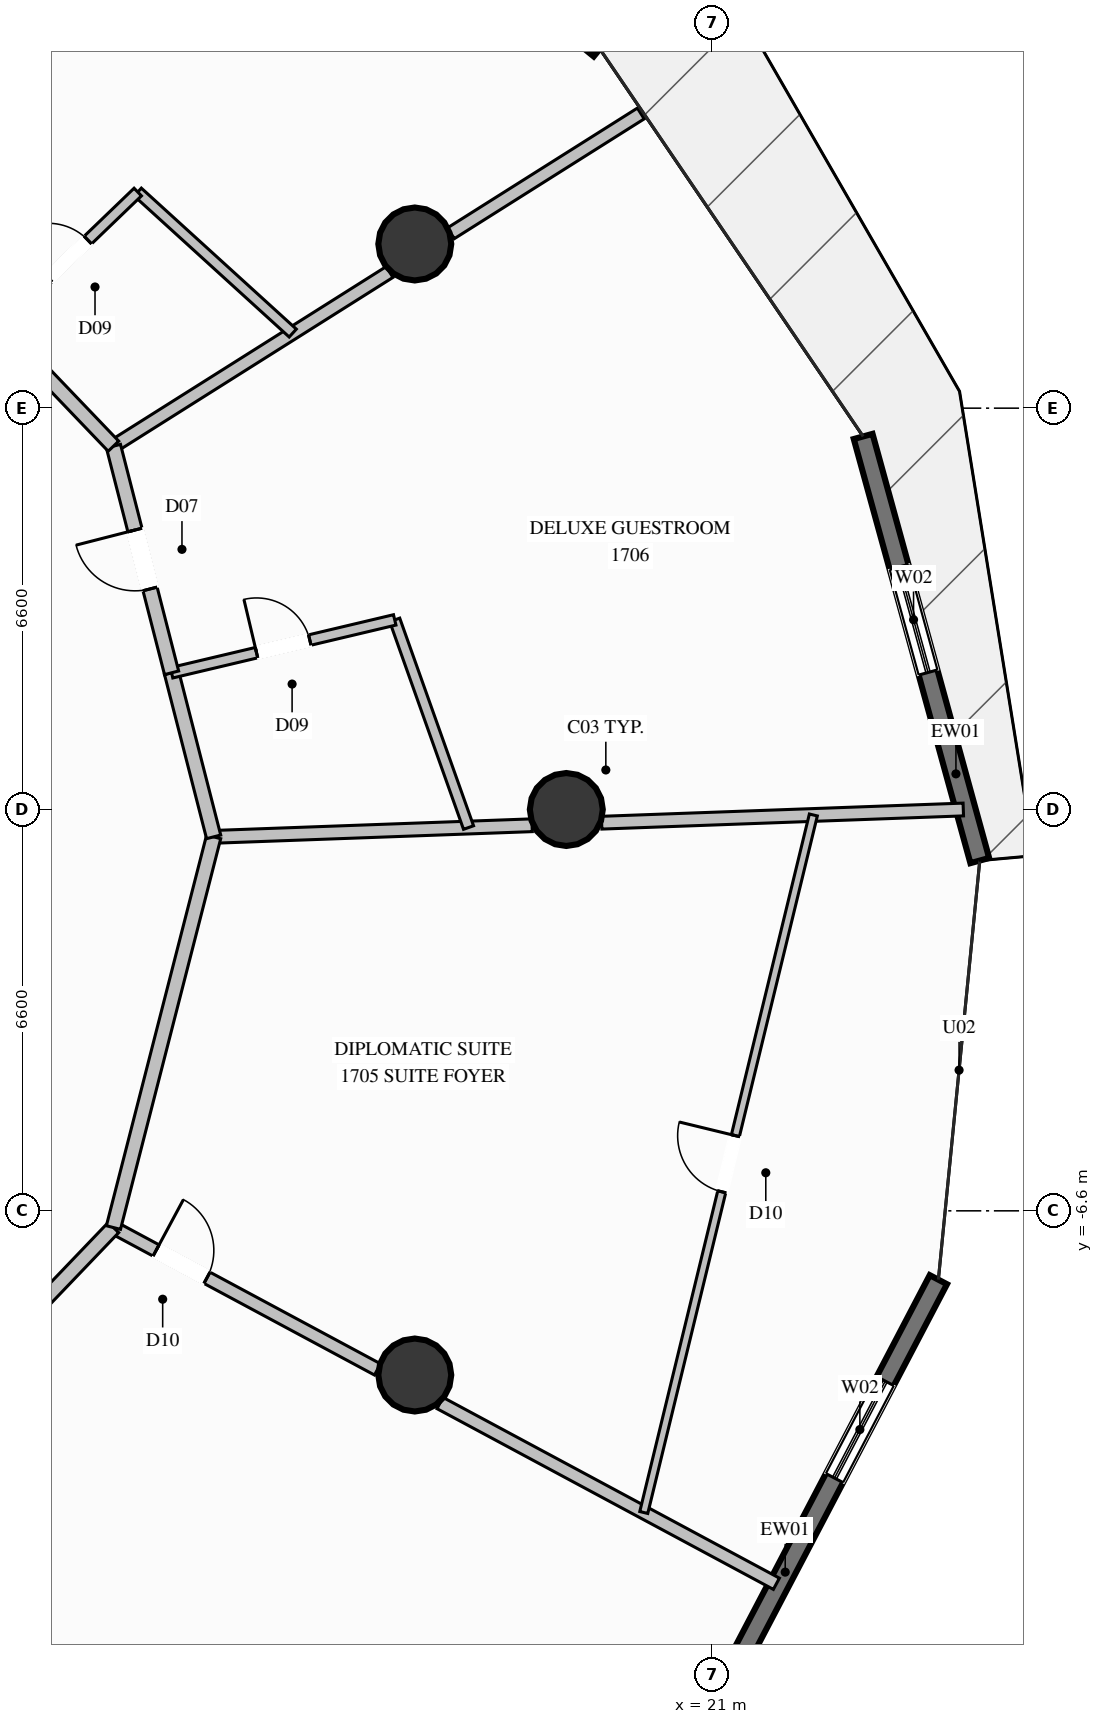
"""IFC4 building model, lengths in metres.
Left out: names, types, materials, properties, quantities, classifications, styles, units other than length and angle.
Written with IfcOpenShell. Run it as: python <this file> out.ifc"""

import sys

from ifc_helpers import new_model, si_unit, direction, frame, frame_2d, origin, origin_2d, place, context, subcontext, project, spatial, rectangle, circle, extrude, element, fill, save


model = new_model("IFC4")
c1 = context("Model", 3, precision=1e-05, world=origin(), true_north=direction((0.0, 1.0)))
c2 = subcontext(c1, "Body", "Model", "MODEL_VIEW")
j1 = project(units=[si_unit("LENGTHUNIT", "METRE"), si_unit("PLANEANGLEUNIT", "RADIAN")], contexts=[c1])
p1 = place(None, origin())
s1 = spatial("IfcSite", under=j1, at=p1, CompositionType="ELEMENT")
p2 = place(p1, origin())
s2 = spatial("IfcBuilding", under=s1, at=p2, CompositionType="ELEMENT")
p3 = place(p2, frame((0.0, 0.0, 64.4)))
s3 = spatial("IfcBuildingStorey", under=s2, at=p3, CompositionType="ELEMENT", Elevation=64.4)
for number, where, z_axis, x_axis in (
    (1, (18.6, 0.0, 0.0), (0.0, 0.0, 1.0), (1.0, 0.0, 0.0)),
    (2, (16.108, 9.3, 0.0), (0.0, 0.0, 1.0), (1.0, 0.0, 0.0)),
    (3, (16.108, -9.3, 0.0), (0.0, 0.0, 1.0), (1.0, 0.0, 0.0)),
):
    element("IfcColumn", number, at=place(p3, frame(where, z_axis=z_axis, x_axis=x_axis)), inside=s3, PredefinedType="COLUMN", context=c2, shape_type="SweptSolid", body=[
        extrude(circle(Radius=0.6, at=origin_2d()), origin(), (0.0, 0.0, 1.0), 3.6),
    ])
p4 = place(p3, frame((23.482, 6.135, 0.0), z_axis=(0.0, 0.0, 1.0), x_axis=(0.265132950738, -0.964211863873, 0.0)))
e4 = element("IfcWall", 4, at=p4, inside=s3, PredefinedType="SOLIDWALL", context=c2, shape_type="SweptSolid", body=[
    extrude(rectangle(XDim=7.234, YDim=0.32, at=frame_2d((3.617, 0.0))), origin(), (0.0, 0.0, 1.0), 3.34),
])
p5 = place(p4, frame((2.226, 0.0, 0.35)))
e5 = element("IfcOpeningElement", 5, at=p5, cuts=e4, PredefinedType="OPENING", context=c2, shape_type="SweptSolid", body=[
    extrude(rectangle(XDim=1.8, YDim=2.6, at=frame_2d((0.9, 1.3))), frame((0.0, 0.17, 0.0), z_axis=(0.0, -1.0, 0.0), x_axis=(1.0, 0.0, 0.0)), (0.0, 0.0, 1.0), 0.34),
])
p6 = place(p3, frame((12.836, 17.658, 0.0), z_axis=(0.0, 0.0, 1.0), x_axis=(0.775030651079, -0.631923642451, 0.0)))
e6 = element("IfcWall", 6, at=p6, inside=s3, PredefinedType="SOLIDWALL", context=c2, shape_type="SweptSolid", body=[
    extrude(rectangle(XDim=8.15, YDim=0.32, at=frame_2d((4.075, 0.0))), origin(), (0.0, 0.0, 1.0), 3.34),
])
p7 = place(p6, frame((3.175, 0.0, 0.35)))
e7 = element("IfcOpeningElement", 7, at=p7, cuts=e6, PredefinedType="OPENING", context=c2, shape_type="SweptSolid", body=[
    extrude(rectangle(XDim=1.8, YDim=2.6, at=frame_2d((0.9, 1.3))), frame((0.0, 0.17, 0.0), z_axis=(0.0, -1.0, 0.0), x_axis=(1.0, 0.0, 0.0)), (0.0, 0.0, 1.0), 0.34),
])
p8 = place(p3, frame((24.719, -7.732, 0.0), z_axis=(0.0, 0.0, 1.0), x_axis=(-0.463929273227, -0.885872242168, 0.0)))
e8 = element("IfcWall", 8, at=p8, inside=s3, PredefinedType="SOLIDWALL", context=c2, shape_type="SweptSolid", body=[
    extrude(rectangle(XDim=6.925, YDim=0.32, at=frame_2d((3.463, 0.0))), origin(), (0.0, 0.0, 1.0), 3.34),
])
p9 = place(p8, frame((1.883, 0.0, 0.35)))
e9 = element("IfcOpeningElement", 9, at=p9, cuts=e8, PredefinedType="OPENING", context=c2, shape_type="SweptSolid", body=[
    extrude(rectangle(XDim=1.8, YDim=2.6, at=frame_2d((0.9, 1.3))), frame((0.0, 0.17, 0.0), z_axis=(0.0, -1.0, 0.0), x_axis=(1.0, 0.0, 0.0)), (0.0, 0.0, 1.0), 0.34),
])
p10 = place(p3, frame((12.8, -0.45, 0.0), z_axis=(0.0, 0.0, 1.0), x_axis=(0.999336171626, 0.036430976934, 0.0)))
e10 = element("IfcWall", 10, at=p10, inside=s3, PredefinedType="PARTITIONING", context=c2, shape_type="SweptSolid", body=[
    extrude(rectangle(XDim=5.24, YDim=0.21, at=frame_2d((2.62, 0.0))), origin(), (0.0, 0.0, 1.0), 2.708),
])
p11 = place(p3, frame((19.181, -0.217, 0.0), z_axis=(0.0, 0.0, 1.0), x_axis=(0.999334912842, 0.036465490191, 0.0)))
e11 = element("IfcWall", 11, at=p11, inside=s3, PredefinedType="PARTITIONING", context=c2, shape_type="SweptSolid", body=[
    extrude(rectangle(XDim=5.952, YDim=0.21, at=frame_2d((2.976, 0.0))), origin(), (0.0, 0.0, 1.0), 3.34),
])
p12 = place(p3, frame((11.152, 5.975, 0.0), z_axis=(0.0, 0.0, 1.0), x_axis=(0.845824796296, 0.533460789535, 0.0)))
e12 = element("IfcWall", 12, at=p12, inside=s3, PredefinedType="PARTITIONING", context=c2, shape_type="SweptSolid", body=[
    extrude(rectangle(XDim=5.369, YDim=0.21, at=frame_2d((2.684, 0.0))), origin(), (0.0, 0.0, 1.0), 2.708),
])
p13 = place(p3, frame((16.702, 9.476, 0.0), z_axis=(0.0, 0.0, 1.0), x_axis=(0.845791996805, 0.533512790981, 0.0)))
e13 = element("IfcWall", 13, at=p13, inside=s3, PredefinedType="PARTITIONING", context=c2, shape_type="SweptSolid", body=[
    extrude(rectangle(XDim=3.692, YDim=0.21, at=frame_2d((1.846, 0.0))), origin(), (0.0, 0.0, 1.0), 3.34),
])
p14 = place(p3, frame((11.152, -6.875, 0.0), z_axis=(0.0, 0.0, 1.0), x_axis=(0.880939761167, -0.473228419682, 0.0)))
e14 = element("IfcWall", 14, at=p14, inside=s3, PredefinedType="PARTITIONING", context=c2, shape_type="SweptSolid", body=[
    extrude(rectangle(XDim=4.93, YDim=0.21, at=frame_2d((2.465, 0.0))), origin(), (0.0, 0.0, 1.0), 2.708),
])
p15 = place(p14, frame((0.796, 0.0, 0.0)))
e15 = element("IfcOpeningElement", 15, at=p15, cuts=e14, PredefinedType="OPENING", context=c2, shape_type="SweptSolid", body=[
    extrude(rectangle(XDim=0.95, YDim=2.1, at=frame_2d((0.475, 1.05))), frame((0.0, 0.115, 0.0), z_axis=(0.0, -1.0, 0.0), x_axis=(1.0, 0.0, 0.0)), (0.0, 0.0, 1.0), 0.23),
])
p16 = place(p3, frame((16.523, -9.761, 0.0), z_axis=(0.0, 0.0, 1.0), x_axis=(0.88092509849, -0.473255714017, 0.0)))
e16 = element("IfcWall", 16, at=p16, inside=s3, PredefinedType="PARTITIONING", context=c2, shape_type="SweptSolid", body=[
    extrude(rectangle(XDim=6.28, YDim=0.21, at=frame_2d((3.14, 0.0))), origin(), (0.0, 0.0, 1.0), 3.34),
])
p17 = place(p3, frame((6.65, -11.578, 0.0), z_axis=(0.0, 0.0, 1.0), x_axis=(0.691526541012, 0.72235105252, 0.0)))
e17 = element("IfcWall", 17, at=p17, inside=s3, PredefinedType="PARTITIONING", context=c2, shape_type="SweptSolid", body=[
    extrude(rectangle(XDim=6.51, YDim=0.24, at=frame_2d((3.255, 0.0))), origin(), (0.0, 0.0, 1.0), 3.34),
])
p18 = place(p3, frame((11.152, -6.875, 0.0), z_axis=(0.0, 0.0, 1.0), x_axis=(0.248446193127, 0.968645698447, 0.0)))
e18 = element("IfcWall", 18, at=p18, inside=s3, PredefinedType="PARTITIONING", context=c2, shape_type="SweptSolid", body=[
    extrude(rectangle(XDim=6.633, YDim=0.24, at=frame_2d((3.316, 0.0))), origin(), (0.0, 0.0, 1.0), 2.917),
])
p19 = place(p3, frame((19.874, -11.561, 0.0), z_axis=(0.0, 0.0, 1.0), x_axis=(0.236258171871, 0.971690319096, 0.0)))
e19 = element("IfcWall", 19, at=p19, inside=s3, PredefinedType="PARTITIONING", context=c2, shape_type="SweptSolid", body=[
    extrude(rectangle(XDim=11.805, YDim=0.135, at=frame_2d((5.903, 0.0))), origin(), (0.0, 0.0, 1.0), 3.34),
])
p20 = place(p19, frame((5.428, 0.0, 0.0)))
e20 = element("IfcOpeningElement", 20, at=p20, cuts=e19, PredefinedType="OPENING", context=c2, shape_type="SweptSolid", body=[
    extrude(rectangle(XDim=0.95, YDim=2.1, at=frame_2d((0.475, 1.05))), frame((0.0, 0.078, 0.0), z_axis=(0.0, -1.0, 0.0), x_axis=(1.0, 0.0, 0.0)), (0.0, 0.0, 1.0), 0.155),
])
p21 = place(p3, frame((12.8, -0.45, 0.0), z_axis=(0.0, 0.0, 1.0), x_axis=(-0.248491333658, 0.968634119313, 0.0)))
e21 = element("IfcWall", 21, at=p21, inside=s3, PredefinedType="PARTITIONING", context=c2, shape_type="SweptSolid", body=[
    extrude(rectangle(XDim=2.785, YDim=0.24, at=frame_2d((1.393, 0.0))), origin(), (0.0, 0.0, 1.0), 2.917),
])
p22 = place(p3, frame((16.992, -0.297, 0.0), z_axis=(0.0, 0.0, 1.0), x_axis=(-0.334919300085, 0.942246816089, 0.0)))
e22 = element("IfcWall", 22, at=p22, inside=s3, PredefinedType="PLUMBINGWALL", context=c2, shape_type="SweptSolid", body=[
    extrude(rectangle(XDim=3.624, YDim=0.175, at=frame_2d((1.812, 0.0))), origin(), (0.0, 0.0, 1.0), 3.34),
])
p23 = place(p3, frame((12.108, 2.248, 0.0), z_axis=(0.0, 0.0, 1.0), x_axis=(0.973043221274, 0.230622829601, 0.0)))
e23 = element("IfcWall", 23, at=p23, inside=s3, PredefinedType="PLUMBINGWALL", context=c2, shape_type="SweptSolid", body=[
    extrude(rectangle(XDim=3.772, YDim=0.175, at=frame_2d((1.886, 0.0))), origin(), (0.0, 0.0, 1.0), 3.34),
])
p24 = place(p23, frame((1.436, 0.0, 0.0)))
e24 = element("IfcOpeningElement", 24, at=p24, cuts=e23, PredefinedType="OPENING", context=c2, shape_type="SweptSolid", body=[
    extrude(rectangle(XDim=0.9, YDim=2.1, at=frame_2d((0.45, 1.05))), frame((0.0, 0.098, 0.0), z_axis=(0.0, -1.0, 0.0), x_axis=(1.0, 0.0, 0.0)), (0.0, 0.0, 1.0), 0.195),
])
p25 = place(p3, frame((12.108, 2.248, 0.0), z_axis=(0.0, 0.0, 1.0), x_axis=(-0.248413515056, 0.9686540794, 0.0)))
e25 = element("IfcWall", 25, at=p25, inside=s3, PredefinedType="PARTITIONING", context=c2, shape_type="SweptSolid", body=[
    extrude(rectangle(XDim=3.848, YDim=0.24, at=frame_2d((1.924, 0.0))), origin(), (0.0, 0.0, 1.0), 2.917),
])
p26 = place(p25, frame((1.424, 0.0, 0.0)))
e26 = element("IfcOpeningElement", 26, at=p26, cuts=e25, PredefinedType="OPENING", context=c2, shape_type="SweptSolid", body=[
    extrude(rectangle(XDim=1.0, YDim=2.2, at=frame_2d((0.5, 1.1))), frame((0.0, 0.13, 0.0), z_axis=(0.0, -1.0, 0.0), x_axis=(1.0, 0.0, 0.0)), (0.0, 0.0, 1.0), 0.26),
])
p27 = place(p3, frame((11.152, 5.975, 0.0), z_axis=(0.0, 0.0, 1.0), x_axis=(-0.69162799291, 0.72225391617, 0.0)))
e27 = element("IfcWall", 27, at=p27, inside=s3, PredefinedType="PARTITIONING", context=c2, shape_type="SweptSolid", body=[
    extrude(rectangle(XDim=2.734, YDim=0.24, at=frame_2d((1.367, 0.0))), origin(), (0.0, 0.0, 1.0), 3.34),
])
p28 = place(p3, frame((14.101, 7.835, 0.0), z_axis=(0.0, 0.0, 1.0), x_axis=(-0.739686776135, 0.672951315632, 0.0)))
e28 = element("IfcWall", 28, at=p28, inside=s3, PredefinedType="PLUMBINGWALL", context=c2, shape_type="SweptSolid", body=[
    extrude(rectangle(XDim=3.446, YDim=0.175, at=frame_2d((1.723, 0.0))), origin(), (0.0, 0.0, 1.0), 3.34),
])
p29 = place(p3, frame((9.261, 7.95, 0.0), z_axis=(0.0, 0.0, 1.0), x_axis=(0.720644149621, 0.693305134567, 0.0)))
e29 = element("IfcWall", 29, at=p29, inside=s3, PredefinedType="PLUMBINGWALL", context=c2, shape_type="SweptSolid", body=[
    extrude(rectangle(XDim=3.179, YDim=0.175, at=frame_2d((1.59, 0.0))), origin(), (0.0, 0.0, 1.0), 3.34),
])
p30 = place(p29, frame((1.14, 0.0, 0.0)))
e30 = element("IfcOpeningElement", 30, at=p30, cuts=e29, PredefinedType="OPENING", context=c2, shape_type="SweptSolid", body=[
    extrude(rectangle(XDim=0.9, YDim=2.1, at=frame_2d((0.45, 1.05))), frame((0.0, 0.098, 0.0), z_axis=(0.0, -1.0, 0.0), x_axis=(1.0, 0.0, 0.0)), (0.0, 0.0, 1.0), 0.195),
])
p31 = place(p5, origin())
e31 = element("IfcWindow", 31, at=p31, inside=s3, PartitioningType="SINGLE_PANEL", PredefinedType="WINDOW", context=c2, shape_type="SweptSolid", body=[
    extrude(rectangle(XDim=1.8, YDim=2.6, at=frame_2d((0.9, 1.3))), frame((0.0, 0.03, 0.0), z_axis=(0.0, -1.0, 0.0), x_axis=(1.0, 0.0, 0.0)), (0.0, 0.0, 1.0), 0.06),
])
fill(e5, e31)
p32 = place(p9, origin())
e32 = element("IfcWindow", 32, at=p32, inside=s3, PartitioningType="SINGLE_PANEL", PredefinedType="WINDOW", context=c2, shape_type="SweptSolid", body=[
    extrude(rectangle(XDim=1.8, YDim=2.6, at=frame_2d((0.9, 1.3))), frame((0.0, 0.03, 0.0), z_axis=(0.0, -1.0, 0.0), x_axis=(1.0, 0.0, 0.0)), (0.0, 0.0, 1.0), 0.06),
])
fill(e9, e32)
p33 = place(p15, origin())
e33 = element("IfcDoor", 33, at=p33, inside=s3, OperationType="SINGLE_SWING_LEFT", PredefinedType="DOOR", context=c2, shape_type="SweptSolid", body=[
    extrude(rectangle(XDim=0.95, YDim=2.1, at=frame_2d((0.475, 1.05))), frame((0.0, 0.025, 0.0), z_axis=(0.0, -1.0, 0.0), x_axis=(1.0, 0.0, 0.0)), (0.0, 0.0, 1.0), 0.05),
])
fill(e15, e33)
p34 = place(p20, origin())
e34 = element("IfcDoor", 34, at=p34, inside=s3, OperationType="SINGLE_SWING_RIGHT", PredefinedType="DOOR", context=c2, shape_type="SweptSolid", body=[
    extrude(rectangle(XDim=0.95, YDim=2.1, at=frame_2d((0.475, 1.05))), frame((0.0, 0.025, 0.0), z_axis=(0.0, -1.0, 0.0), x_axis=(1.0, 0.0, 0.0)), (0.0, 0.0, 1.0), 0.05),
])
fill(e20, e34)
p35 = place(p24, origin())
e35 = element("IfcDoor", 35, at=p35, inside=s3, OperationType="SINGLE_SWING_LEFT", PredefinedType="DOOR", context=c2, shape_type="SweptSolid", body=[
    extrude(rectangle(XDim=0.9, YDim=2.1, at=frame_2d((0.45, 1.05))), frame((0.0, 0.025, 0.0), z_axis=(0.0, -1.0, 0.0), x_axis=(1.0, 0.0, 0.0)), (0.0, 0.0, 1.0), 0.05),
])
fill(e24, e35)
p36 = place(p26, origin())
e36 = element("IfcDoor", 36, at=p36, inside=s3, OperationType="SINGLE_SWING_RIGHT", PredefinedType="DOOR", context=c2, shape_type="SweptSolid", body=[
    extrude(rectangle(XDim=1.0, YDim=2.2, at=frame_2d((0.5, 1.1))), frame((0.0, 0.025, 0.0), z_axis=(0.0, -1.0, 0.0), x_axis=(1.0, 0.0, 0.0)), (0.0, 0.0, 1.0), 0.05),
])
fill(e26, e36)
p37 = place(p30, origin())
e37 = element("IfcDoor", 37, at=p37, inside=s3, OperationType="SINGLE_SWING_LEFT", PredefinedType="DOOR", context=c2, shape_type="SweptSolid", body=[
    extrude(rectangle(XDim=0.9, YDim=2.1, at=frame_2d((0.45, 1.05))), frame((0.0, 0.025, 0.0), z_axis=(0.0, -1.0, 0.0), x_axis=(1.0, 0.0, 0.0)), (0.0, 0.0, 1.0), 0.05),
])
fill(e30, e37)
save(model, sys.argv[1])
